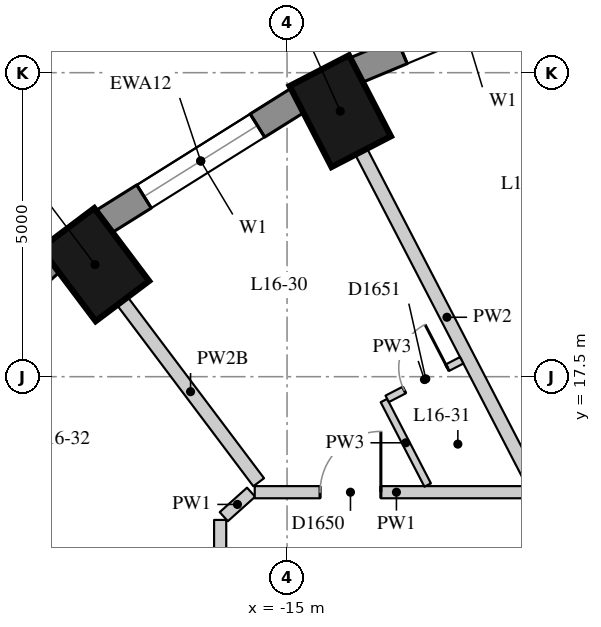
"""IFC4 building model, lengths in metres.
Left out: names, types, materials, properties, quantities, classifications, styles, units other than length and angle.
Written with IfcOpenShell. Run it as: python <this file> out.ifc"""

import sys

from ifc_helpers import new_model, si_unit, direction, frame, frame_2d, origin, origin_2d, place, context, subcontext, project, spatial, rectangle, extrude, element, fill, save


model = new_model("IFC4")
c1 = context("Model", 3, precision=1e-05, world=origin(), true_north=direction((0.0, 1.0)))
c2 = subcontext(c1, "Body", "Model", "MODEL_VIEW")
j1 = project(units=[si_unit("LENGTHUNIT", "METRE"), si_unit("PLANEANGLEUNIT", "RADIAN")], contexts=[c1])
p1 = place(None, origin())
s1 = spatial("IfcSite", under=j1, at=p1, CompositionType="ELEMENT")
p2 = place(p1, origin())
s2 = spatial("IfcBuilding", under=s1, at=p2, CompositionType="ELEMENT")
p3 = place(p2, frame((0.0, 0.0, 61.3)))
s3 = spatial("IfcBuildingStorey", under=s2, at=p3, CompositionType="ELEMENT", Elevation=61.3)
for number, where, z_axis, x_axis in (
    (1, (-14.125, 21.867, 0.0), (0.0, 0.0, 1.0), (-0.46, 0.888, 0.0)),
    (2, (-18.159, 19.343, 0.0), (0.0, 0.0, 1.0), (-0.601, 0.799, 0.0)),
):
    element("IfcColumn", number, at=place(p3, frame(where, z_axis=z_axis, x_axis=x_axis)), inside=s3, PredefinedType="COLUMN", context=c2, shape_type="SweptSolid", body=[
        extrude(rectangle(XDim=1.5, YDim=1.1, at=origin_2d()), origin(), (0.0, 0.0, 1.0), 3.3),
    ])
p4 = place(p3, frame((-10.315, 24.021, 0.0), z_axis=(0.0, 0.0, 1.0), x_axis=(-0.923031964282, -0.384723267966, 0.0)))
e3 = element("IfcWall", 3, at=p4, inside=s3, PredefinedType="SOLIDWALL", context=c2, shape_type="SweptSolid", body=[
    extrude(rectangle(XDim=3.856, YDim=0.45, at=frame_2d((1.928, 0.0))), origin(), (0.0, 0.0, 1.0), 3.02),
])
p5 = place(p4, frame((0.828, 0.0, 0.4)))
e4 = element("IfcOpeningElement", 4, at=p5, cuts=e3, PredefinedType="OPENING", context=c2, shape_type="SweptSolid", body=[
    extrude(rectangle(XDim=2.2, YDim=1.75, at=frame_2d((1.1, 0.875))), frame((0.0, 0.235, 0.0), z_axis=(0.0, -1.0, 0.0), x_axis=(1.0, 0.0, 0.0)), (0.0, 0.0, 1.0), 0.47),
])
p6 = place(p3, frame((-14.817, 22.051, 0.0), z_axis=(0.0, 0.0, 1.0), x_axis=(-0.847635480093, -0.530579016629, 0.0)))
e5 = element("IfcWall", 5, at=p6, inside=s3, PredefinedType="SOLIDWALL", context=c2, shape_type="SweptSolid", body=[
    extrude(rectangle(XDim=3.782, YDim=0.45, at=frame_2d((1.891, 0.0))), origin(), (0.0, 0.0, 1.0), 3.02),
])
p7 = place(p6, frame((0.791, 0.0, 0.4)))
e6 = element("IfcOpeningElement", 6, at=p7, cuts=e5, PredefinedType="OPENING", context=c2, shape_type="SweptSolid", body=[
    extrude(rectangle(XDim=2.2, YDim=1.75, at=frame_2d((1.1, 0.875))), frame((0.0, 0.235, 0.0), z_axis=(0.0, -1.0, 0.0), x_axis=(1.0, 0.0, 0.0)), (0.0, 0.0, 1.0), 0.47),
])
p8 = place(p3, frame((-18.871, 19.407, 0.0), z_axis=(0.0, 0.0, 1.0), x_axis=(-0.745526233716, -0.66647628228, 0.0)))
e7 = element("IfcWall", 7, at=p8, inside=s3, PredefinedType="SOLIDWALL", context=c2, shape_type="SweptSolid", body=[
    extrude(rectangle(XDim=3.697, YDim=0.45, at=frame_2d((1.848, 0.0))), origin(), (0.0, 0.0, 1.0), 3.02),
])
p9 = place(p8, frame((0.749, 0.0, 0.4)))
e8 = element("IfcOpeningElement", 8, at=p9, cuts=e7, PredefinedType="OPENING", context=c2, shape_type="SweptSolid", body=[
    extrude(rectangle(XDim=2.2, YDim=1.75, at=frame_2d((1.1, 0.875))), frame((0.0, 0.235, 0.0), z_axis=(0.0, -1.0, 0.0), x_axis=(1.0, 0.0, 0.0)), (0.0, 0.0, 1.0), 0.47),
])
p10 = place(p3, frame((-16.1, 11.047, 0.0), z_axis=(0.0, 0.0, 1.0), x_axis=(0.0, 1.0, 0.0)))
e9 = element("IfcWall", 9, at=p10, inside=s3, PredefinedType="PARTITIONING", context=c2, shape_type="SweptSolid", body=[
    extrude(rectangle(XDim=4.097, YDim=0.2, at=frame_2d((2.048, 0.0))), origin(), (0.0, 0.0, 1.0), 3.02),
])
p11 = place(p10, frame((1.499, 0.0, 0.0)))
e10 = element("IfcOpeningElement", 10, at=p11, cuts=e9, PredefinedType="OPENING", context=c2, shape_type="SweptSolid", body=[
    extrude(rectangle(XDim=1.1, YDim=2.1, at=frame_2d((0.55, 1.05))), frame((0.0, 0.11, 0.0), z_axis=(0.0, -1.0, 0.0), x_axis=(1.0, 0.0, 0.0)), (0.0, 0.0, 1.0), 0.22),
])
p12 = place(p3, frame((-16.041, 15.198, 0.0), z_axis=(0.0, 0.0, 1.0), x_axis=(0.744722115519, 0.667374685359, 0.0)))
e11 = element("IfcWall", 11, at=p12, inside=s3, PredefinedType="PARTITIONING", context=c2, shape_type="SweptSolid", body=[
    extrude(rectangle(XDim=0.603, YDim=0.2, at=frame_2d((0.301, 0.0))), origin(), (0.0, 0.0, 1.0), 3.02),
])
p13 = place(p3, frame((-15.531, 15.6, 0.0), z_axis=(0.0, 0.0, 1.0), x_axis=(1.0, 0.0, 0.0)))
e12 = element("IfcWall", 12, at=p13, inside=s3, PredefinedType="PARTITIONING", context=c2, shape_type="SweptSolid", body=[
    extrude(rectangle(XDim=4.66, YDim=0.2, at=frame_2d((2.33, 0.0))), origin(), (0.0, 0.0, 1.0), 3.02),
])
p14 = place(p13, frame((1.074, 0.0, 0.0)))
e13 = element("IfcOpeningElement", 13, at=p14, cuts=e12, PredefinedType="OPENING", context=c2, shape_type="SweptSolid", body=[
    extrude(rectangle(XDim=1.0, YDim=2.1, at=frame_2d((0.5, 1.05))), frame((0.0, 0.11, 0.0), z_axis=(0.0, -1.0, 0.0), x_axis=(1.0, 0.0, 0.0)), (0.0, 0.0, 1.0), 0.22),
])
p15 = place(p3, frame((-13.78, 21.201, 0.0), z_axis=(0.0, 0.0, 1.0), x_axis=(0.459699000582, -0.888074787878, 0.0)))
e14 = element("IfcWall", 14, at=p15, inside=s3, PredefinedType="PARTITIONING", context=c2, shape_type="SweptSolid", body=[
    extrude(rectangle(XDim=6.134, YDim=0.22, at=frame_2d((3.067, 0.0))), origin(), (0.0, 0.0, 1.0), 3.02),
])
p16 = place(p3, frame((-17.708, 18.743, 0.0), z_axis=(0.0, 0.0, 1.0), x_axis=(0.601172757903, -0.799119086967, 0.0)))
e15 = element("IfcWall", 15, at=p16, inside=s3, PredefinedType="PARTITIONING", context=c2, shape_type="SweptSolid", body=[
    extrude(rectangle(XDim=3.729, YDim=0.22, at=frame_2d((1.864, 0.0))), origin(), (0.0, 0.0, 1.0), 2.57),
])
p17 = place(p3, frame((-21.093, 15.718, 0.0), z_axis=(0.0, 0.0, 1.0), x_axis=(0.73009284205, -0.683347965525, 0.0)))
e16 = element("IfcWall", 16, at=p17, inside=s3, PredefinedType="PARTITIONING", context=c2, shape_type="SweptSolid", body=[
    extrude(rectangle(XDim=6.602, YDim=0.22, at=frame_2d((3.301, 0.0))), origin(), (0.0, 0.0, 1.0), 3.02),
])
p18 = place(p3, frame((-12.687, 15.718, 0.0), z_axis=(0.0, 0.0, 1.0), x_axis=(-0.459775159711, 0.888035361071, 0.0)))
e17 = element("IfcWall", 17, at=p18, inside=s3, PredefinedType="PARTITIONING", context=c2, shape_type="SweptSolid", body=[
    extrude(rectangle(XDim=1.565, YDim=0.12, at=frame_2d((0.782, 0.0))), origin(), (0.0, 0.0, 1.0), 3.02),
])
p19 = place(p3, frame((-13.353, 17.135, 0.0), z_axis=(0.0, 0.0, 1.0), x_axis=(0.888075681402, 0.459697274413, 0.0)))
e18 = element("IfcWall", 18, at=p19, inside=s3, PredefinedType="PARTITIONING", context=c2, shape_type="SweptSolid", body=[
    extrude(rectangle(XDim=1.38, YDim=0.12, at=frame_2d((0.69, 0.0))), origin(), (0.0, 0.0, 1.0), 3.02),
])
p20 = place(p19, frame((0.315, 0.0, 0.0)))
e19 = element("IfcOpeningElement", 19, at=p20, cuts=e18, PredefinedType="OPENING", context=c2, shape_type="SweptSolid", body=[
    extrude(rectangle(XDim=0.8, YDim=2.1, at=frame_2d((0.4, 1.05))), frame((0.0, 0.07, 0.0), z_axis=(0.0, -1.0, 0.0), x_axis=(1.0, 0.0, 0.0)), (0.0, 0.0, 1.0), 0.14),
])
p21 = place(p5, origin())
e20 = element("IfcWindow", 20, at=p21, inside=s3, PartitioningType="SINGLE_PANEL", PredefinedType="WINDOW", context=c2, shape_type="SweptSolid", body=[
    extrude(rectangle(XDim=2.2, YDim=1.75, at=frame_2d((1.1, 0.875))), frame((0.0, 0.035, 0.0), z_axis=(0.0, -1.0, 0.0), x_axis=(1.0, 0.0, 0.0)), (0.0, 0.0, 1.0), 0.06),
])
fill(e4, e20)
p22 = place(p7, origin())
e21 = element("IfcWindow", 21, at=p22, inside=s3, PartitioningType="SINGLE_PANEL", PredefinedType="WINDOW", context=c2, shape_type="SweptSolid", body=[
    extrude(rectangle(XDim=2.2, YDim=1.75, at=frame_2d((1.1, 0.875))), frame((0.0, 0.035, 0.0), z_axis=(0.0, -1.0, 0.0), x_axis=(1.0, 0.0, 0.0)), (0.0, 0.0, 1.0), 0.06),
])
fill(e6, e21)
p23 = place(p14, origin())
e22 = element("IfcDoor", 22, at=p23, inside=s3, OperationType="SINGLE_SWING_RIGHT", PredefinedType="DOOR", context=c2, shape_type="SweptSolid", body=[
    extrude(rectangle(XDim=1.0, YDim=2.1, at=frame_2d((0.5, 1.05))), frame((0.0, 0.025, 0.0), z_axis=(0.0, -1.0, 0.0), x_axis=(1.0, 0.0, 0.0)), (0.0, 0.0, 1.0), 0.05),
])
fill(e13, e22)
p24 = place(p20, origin())
e23 = element("IfcDoor", 23, at=p24, inside=s3, OperationType="SINGLE_SWING_RIGHT", PredefinedType="DOOR", context=c2, shape_type="SweptSolid", body=[
    extrude(rectangle(XDim=0.8, YDim=2.1, at=frame_2d((0.4, 1.05))), frame((0.0, 0.025, 0.0), z_axis=(0.0, -1.0, 0.0), x_axis=(1.0, 0.0, 0.0)), (0.0, 0.0, 1.0), 0.05),
])
fill(e19, e23)
save(model, sys.argv[1])
